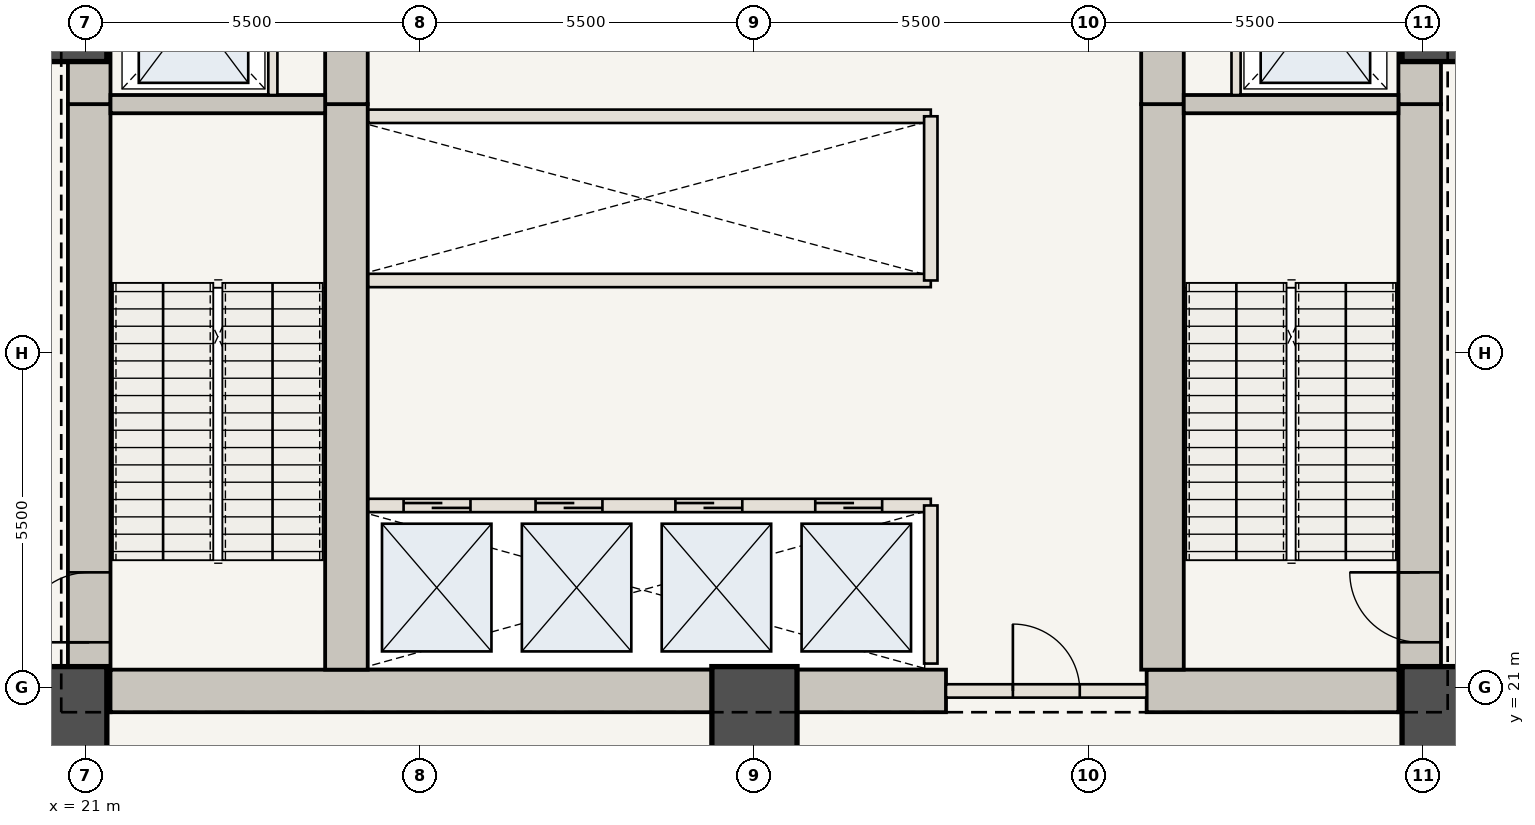
"""IFC4 building model, lengths in metres.
Left out: names, types, materials, properties, quantities, classifications, styles, units other than length and angle.
Written with IfcOpenShell. Run it as: python <this file> out.ifc"""

import sys

from ifc_helpers import new_model, si_unit, direction, frame, frame_2d, origin, origin_2d, place, context, subcontext, project, spatial, rectangle, extrude, element, fill, save


model = new_model("IFC4")
c1 = context("Model", 3, precision=1e-05, world=origin(), true_north=direction((0.0, 1.0)))
c2 = subcontext(c1, "Body", "Model", "MODEL_VIEW")
j1 = project(units=[si_unit("LENGTHUNIT", "METRE"), si_unit("PLANEANGLEUNIT", "RADIAN")], contexts=[c1])
p1 = place(None, origin())
s1 = spatial("IfcSite", under=j1, at=p1, CompositionType="ELEMENT")
p2 = place(p1, origin())
s2 = spatial("IfcBuilding", under=s1, at=p2, CompositionType="ELEMENT")
p3 = place(p2, frame((0.0, 0.0, 17.85)))
s3 = spatial("IfcBuildingStorey", under=s2, at=p3, CompositionType="ELEMENT", Elevation=17.85)
p4 = place(p3, frame((21.06, 20.6, 0.0), z_axis=(0.0, 0.0, 1.0), x_axis=(0.0, 1.0, 0.0)))
e1 = element("IfcWall", 1, at=p4, inside=s3, PredefinedType="SHEAR", context=c2, shape_type="SweptSolid", body=[
    extrude(rectangle(XDim=10.0, YDim=0.7, at=frame_2d((5.0, 0.0))), origin(), (0.0, 0.0, 1.0), 5.95),
])
p5 = place(p4, frame((1.15, 0.0, 0.0)))
e2 = element("IfcOpeningElement", 2, at=p5, cuts=e1, PredefinedType="OPENING", context=c2, shape_type="SweptSolid", body=[
    extrude(rectangle(XDim=1.15, YDim=2.15, at=frame_2d((0.575, 1.075))), frame((0.0, 0.36, 0.0), z_axis=(0.0, -1.0, 0.0), x_axis=(1.0, 0.0, 0.0)), (0.0, 0.0, 1.0), 0.72),
])
p6 = place(p3, frame((21.06, 30.6, 0.0), z_axis=(0.0, 0.0, 1.0), x_axis=(0.0, 1.0, 0.0)))
e3 = element("IfcWall", 3, at=p6, inside=s3, PredefinedType="SHEAR", context=c2, shape_type="SweptSolid", body=[
    extrude(rectangle(XDim=12.75, YDim=0.7, at=frame_2d((6.375, 0.0))), origin(), (0.0, 0.0, 1.0), 5.95),
])
p7 = place(p6, frame((4.2, 0.0, 0.0)))
e4 = element("IfcOpeningElement", 4, at=p7, cuts=e3, PredefinedType="OPENING", context=c2, shape_type="SweptSolid", body=[
    extrude(rectangle(XDim=1.1, YDim=2.15, at=frame_2d((0.55, 1.075))), frame((0.0, 0.36, 0.0), z_axis=(0.0, -1.0, 0.0), x_axis=(1.0, 0.0, 0.0)), (0.0, 0.0, 1.0), 0.72),
])
p8 = place(p6, frame((8.05, 0.0, 0.0)))
e5 = element("IfcOpeningElement", 5, at=p8, cuts=e3, PredefinedType="OPENING", context=c2, shape_type="SweptSolid", body=[
    extrude(rectangle(XDim=0.92, YDim=2.1, at=frame_2d((0.46, 1.05))), frame((0.0, 0.36, 0.0), z_axis=(0.0, -1.0, 0.0), x_axis=(1.0, 0.0, 0.0)), (0.0, 0.0, 1.0), 0.72),
])
p9 = place(p6, frame((9.45, 0.0, 0.0)))
e6 = element("IfcOpeningElement", 6, at=p9, cuts=e3, PredefinedType="OPENING", context=c2, shape_type="SweptSolid", body=[
    extrude(rectangle(XDim=0.88, YDim=2.1, at=frame_2d((0.44, 1.05))), frame((0.0, 0.36, 0.0), z_axis=(0.0, -1.0, 0.0), x_axis=(1.0, 0.0, 0.0)), (0.0, 0.0, 1.0), 0.72),
])
p10 = place(p6, frame((10.85, 0.0, 0.0)))
e7 = element("IfcOpeningElement", 7, at=p10, cuts=e3, PredefinedType="OPENING", context=c2, shape_type="SweptSolid", body=[
    extrude(rectangle(XDim=0.88, YDim=2.1, at=frame_2d((0.44, 1.05))), frame((0.0, 0.36, 0.0), z_axis=(0.0, -1.0, 0.0), x_axis=(1.0, 0.0, 0.0)), (0.0, 0.0, 1.0), 0.72),
])
p11 = place(p3, frame((42.94, 20.6, 0.0), z_axis=(0.0, 0.0, 1.0), x_axis=(0.0, 1.0, 0.0)))
e8 = element("IfcWall", 8, at=p11, inside=s3, PredefinedType="SHEAR", context=c2, shape_type="SweptSolid", body=[
    extrude(rectangle(XDim=10.0, YDim=0.7, at=frame_2d((5.0, 0.0))), origin(), (0.0, 0.0, 1.0), 5.95),
])
p12 = place(p11, frame((1.15, 0.0, 0.0)))
e9 = element("IfcOpeningElement", 9, at=p12, cuts=e8, PredefinedType="OPENING", context=c2, shape_type="SweptSolid", body=[
    extrude(rectangle(XDim=1.15, YDim=2.15, at=frame_2d((0.575, 1.075))), frame((0.0, 0.36, 0.0), z_axis=(0.0, -1.0, 0.0), x_axis=(1.0, 0.0, 0.0)), (0.0, 0.0, 1.0), 0.72),
])
p13 = place(p3, frame((42.94, 30.6, 0.0), z_axis=(0.0, 0.0, 1.0), x_axis=(0.0, 1.0, 0.0)))
e10 = element("IfcWall", 10, at=p13, inside=s3, PredefinedType="SHEAR", context=c2, shape_type="SweptSolid", body=[
    extrude(rectangle(XDim=12.75, YDim=0.7, at=frame_2d((6.375, 0.0))), origin(), (0.0, 0.0, 1.0), 5.95),
])
p14 = place(p13, frame((4.2, 0.0, 0.0)))
e11 = element("IfcOpeningElement", 11, at=p14, cuts=e10, PredefinedType="OPENING", context=c2, shape_type="SweptSolid", body=[
    extrude(rectangle(XDim=1.1, YDim=2.15, at=frame_2d((0.55, 1.075))), frame((0.0, 0.36, 0.0), z_axis=(0.0, -1.0, 0.0), x_axis=(1.0, 0.0, 0.0)), (0.0, 0.0, 1.0), 0.72),
])
p15 = place(p13, frame((9.2, 0.0, 0.0)))
e12 = element("IfcOpeningElement", 12, at=p15, cuts=e10, PredefinedType="OPENING", context=c2, shape_type="SweptSolid", body=[
    extrude(rectangle(XDim=0.92, YDim=2.1, at=frame_2d((0.46, 1.05))), frame((0.0, 0.36, 0.0), z_axis=(0.0, -1.0, 0.0), x_axis=(1.0, 0.0, 0.0)), (0.0, 0.0, 1.0), 0.72),
])
p16 = place(p3, frame((21.41, 20.95, 0.0), z_axis=(0.0, 0.0, 1.0), x_axis=(1.0, 0.0, 0.0)))
e13 = element("IfcWall", 13, at=p16, inside=s3, PredefinedType="SHEAR", context=c2, shape_type="SweptSolid", body=[
    extrude(rectangle(XDim=13.74, YDim=0.7, at=frame_2d((6.87, 0.0))), origin(), (0.0, 0.0, 1.0), 5.95),
])
p17 = place(p3, frame((38.45, 20.95, 0.0), z_axis=(0.0, 0.0, 1.0), x_axis=(1.0, 0.0, 0.0)))
e14 = element("IfcWall", 14, at=p17, inside=s3, PredefinedType="SHEAR", context=c2, shape_type="SweptSolid", body=[
    extrude(rectangle(XDim=4.14, YDim=0.7, at=frame_2d((2.07, 0.0))), origin(), (0.0, 0.0, 1.0), 5.95),
])
p18 = place(p3, frame((25.29, 21.3, 0.0), z_axis=(0.0, 0.0, 1.0), x_axis=(0.0, 1.0, 0.0)))
e15 = element("IfcWall", 15, at=p18, inside=s3, PredefinedType="SHEAR", context=c2, shape_type="SweptSolid", body=[
    extrude(rectangle(XDim=9.3, YDim=0.7, at=frame_2d((4.65, 0.0))), origin(), (0.0, 0.0, 1.0), 5.95),
])
p19 = place(p3, frame((25.29, 30.6, 0.0), z_axis=(0.0, 0.0, 1.0), x_axis=(0.0, 1.0, 0.0)))
e16 = element("IfcWall", 16, at=p19, inside=s3, PredefinedType="SHEAR", context=c2, shape_type="SweptSolid", body=[
    extrude(rectangle(XDim=12.05, YDim=0.7, at=frame_2d((6.025, 0.0))), origin(), (0.0, 0.0, 1.0), 5.95),
])
p20 = place(p19, frame((6.25, 0.0, 0.0)))
e17 = element("IfcOpeningElement", 17, at=p20, cuts=e16, PredefinedType="OPENING", context=c2, shape_type="SweptSolid", body=[
    extrude(rectangle(XDim=1.1, YDim=2.15, at=frame_2d((0.55, 1.075))), frame((0.0, 0.36, 0.0), z_axis=(0.0, -1.0, 0.0), x_axis=(1.0, 0.0, 0.0)), (0.0, 0.0, 1.0), 0.72),
])
p21 = place(p3, frame((38.71, 21.3, 0.0), z_axis=(0.0, 0.0, 1.0), x_axis=(0.0, 1.0, 0.0)))
e18 = element("IfcWall", 18, at=p21, inside=s3, PredefinedType="SHEAR", context=c2, shape_type="SweptSolid", body=[
    extrude(rectangle(XDim=9.3, YDim=0.7, at=frame_2d((4.65, 0.0))), origin(), (0.0, 0.0, 1.0), 5.95),
])
p22 = place(p3, frame((38.71, 30.6, 0.0), z_axis=(0.0, 0.0, 1.0), x_axis=(0.0, 1.0, 0.0)))
e19 = element("IfcWall", 19, at=p22, inside=s3, PredefinedType="SHEAR", context=c2, shape_type="SweptSolid", body=[
    extrude(rectangle(XDim=12.05, YDim=0.7, at=frame_2d((6.025, 0.0))), origin(), (0.0, 0.0, 1.0), 5.95),
])
for number, where, z_axis, x_axis in (
    (20, (20.65, 20.65, 0.0), (0.0, 0.0, 1.0), (1.0, 0.0, 0.0)),
    (21, (32.0, 20.65, 0.0), (0.0, 0.0, 1.0), (1.0, 0.0, 0.0)),
    (22, (43.35, 20.65, 0.0), (0.0, 0.0, 1.0), (1.0, 0.0, 0.0)),
    (23, (43.35, 32.0, 0.0), (0.0, 0.0, 1.0), (1.0, 0.0, 0.0)),
    (24, (20.65, 32.0, 0.0), (0.0, 0.0, 1.0), (1.0, 0.0, 0.0)),
):
    element("IfcColumn", number, at=place(p3, frame(where, z_axis=z_axis, x_axis=x_axis)), inside=s3, PredefinedType="COLUMN", context=c2, shape_type="SweptSolid", body=[
        extrude(rectangle(XDim=1.4, YDim=1.4, at=origin_2d()), origin(), (0.0, 0.0, 1.0), 5.95),
    ])
for number, where, z_axis, x_axis in (
    (25, (21.41, 30.6, 0.0), (0.0, 0.0, 1.0), (1.0, 0.0, 0.0)),
    (26, (39.06, 30.6, 0.0), (0.0, 0.0, 1.0), (1.0, 0.0, 0.0)),
):
    element("IfcWall", number, at=place(p3, frame(where, z_axis=z_axis, x_axis=x_axis)), inside=s3, PredefinedType="SHEAR", context=c2, shape_type="SweptSolid", body=[
        extrude(rectangle(XDim=3.53, YDim=0.3, at=frame_2d((1.765, 0.0))), origin(), (0.0, 0.0, 1.0), 5.71),
    ])
for number, where, z_axis, x_axis in (
    (27, (24.08, 30.75, 0.0), (0.0, 0.0, 1.0), (0.0, 1.0, 0.0)),
    (28, (39.92, 30.75, 0.0), (0.0, 0.0, 1.0), (0.0, 1.0, 0.0)),
):
    element("IfcWall", number, at=place(p3, frame(where, z_axis=z_axis, x_axis=x_axis)), inside=s3, PredefinedType="STANDARD", context=c2, shape_type="SweptSolid", body=[
        extrude(rectangle(XDim=2.65, YDim=0.15, at=frame_2d((1.325, 0.0))), origin(), (0.0, 0.0, 1.0), 5.71),
    ])
p23 = place(p3, frame((35.15, 20.95, 0.0), z_axis=(0.0, 0.0, 1.0), x_axis=(1.0, 0.0, 0.0)))
e29 = element("IfcWall", 29, at=p23, inside=s3, PredefinedType="STANDARD", context=c2, shape_type="SweptSolid", body=[
    extrude(rectangle(XDim=3.3, YDim=0.22, at=frame_2d((1.65, 0.0))), origin(), (0.0, 0.0, 1.0), 5.71),
])
p24 = place(p23, frame((1.1, 0.0, 0.0)))
e30 = element("IfcOpeningElement", 30, at=p24, cuts=e29, PredefinedType="OPENING", context=c2, shape_type="SweptSolid", body=[
    extrude(rectangle(XDim=1.1, YDim=2.15, at=frame_2d((0.55, 1.075))), frame((0.0, 0.12, 0.0), z_axis=(0.0, -1.0, 0.0), x_axis=(1.0, 0.0, 0.0)), (0.0, 0.0, 1.0), 0.24),
])
p25 = place(p3, frame((25.65, 24.0, 0.0), z_axis=(0.0, 0.0, 1.0), x_axis=(1.0, 0.0, 0.0)))
e31 = element("IfcWall", 31, at=p25, inside=s3, PredefinedType="STANDARD", context=c2, shape_type="SweptSolid", body=[
    extrude(rectangle(XDim=9.25, YDim=0.22, at=frame_2d((4.625, 0.0))), origin(), (0.0, 0.0, 1.0), 5.71),
])
p26 = place(p25, frame((0.58, 0.0, 0.0)))
e32 = element("IfcOpeningElement", 32, at=p26, cuts=e31, PredefinedType="OPENING", context=c2, shape_type="SweptSolid", body=[
    extrude(rectangle(XDim=1.1, YDim=2.15, at=frame_2d((0.55, 1.075))), frame((0.0, 0.12, 0.0), z_axis=(0.0, -1.0, 0.0), x_axis=(1.0, 0.0, 0.0)), (0.0, 0.0, 1.0), 0.24),
])
p27 = place(p25, frame((2.75, 0.0, 0.0)))
e33 = element("IfcOpeningElement", 33, at=p27, cuts=e31, PredefinedType="OPENING", context=c2, shape_type="SweptSolid", body=[
    extrude(rectangle(XDim=1.1, YDim=2.15, at=frame_2d((0.55, 1.075))), frame((0.0, 0.12, 0.0), z_axis=(0.0, -1.0, 0.0), x_axis=(1.0, 0.0, 0.0)), (0.0, 0.0, 1.0), 0.24),
])
p28 = place(p25, frame((5.05, 0.0, 0.0)))
e34 = element("IfcOpeningElement", 34, at=p28, cuts=e31, PredefinedType="OPENING", context=c2, shape_type="SweptSolid", body=[
    extrude(rectangle(XDim=1.1, YDim=2.15, at=frame_2d((0.55, 1.075))), frame((0.0, 0.12, 0.0), z_axis=(0.0, -1.0, 0.0), x_axis=(1.0, 0.0, 0.0)), (0.0, 0.0, 1.0), 0.24),
])
p29 = place(p25, frame((7.35, 0.0, 0.0)))
e35 = element("IfcOpeningElement", 35, at=p29, cuts=e31, PredefinedType="OPENING", context=c2, shape_type="SweptSolid", body=[
    extrude(rectangle(XDim=1.1, YDim=2.15, at=frame_2d((0.55, 1.075))), frame((0.0, 0.12, 0.0), z_axis=(0.0, -1.0, 0.0), x_axis=(1.0, 0.0, 0.0)), (0.0, 0.0, 1.0), 0.24),
])
p30 = place(p3, frame((34.9, 21.4, 0.0), z_axis=(0.0, 0.0, 1.0), x_axis=(0.0, 1.0, 0.0)))
e36 = element("IfcWall", 36, at=p30, inside=s3, PredefinedType="STANDARD", context=c2, shape_type="SweptSolid", body=[
    extrude(rectangle(XDim=2.6, YDim=0.22, at=frame_2d((1.3, 0.0))), origin(), (0.0, 0.0, 1.0), 5.71),
])
for number, where, z_axis, x_axis in (
    (37, (25.65, 27.7, 0.0), (0.0, 0.0, 1.0), (1.0, 0.0, 0.0)),
    (38, (25.65, 30.4, 0.0), (0.0, 0.0, 1.0), (1.0, 0.0, 0.0)),
):
    element("IfcWall", number, at=place(p3, frame(where, z_axis=z_axis, x_axis=x_axis)), inside=s3, PredefinedType="STANDARD", context=c2, shape_type="SweptSolid", body=[
        extrude(rectangle(XDim=9.25, YDim=0.22, at=frame_2d((4.625, 0.0))), origin(), (0.0, 0.0, 1.0), 5.71),
    ])
p31 = place(p3, frame((34.9, 27.7, 0.0), z_axis=(0.0, 0.0, 1.0), x_axis=(0.0, 1.0, 0.0)))
e39 = element("IfcWall", 39, at=p31, inside=s3, PredefinedType="STANDARD", context=c2, shape_type="SweptSolid", body=[
    extrude(rectangle(XDim=2.7, YDim=0.22, at=frame_2d((1.35, 0.0))), origin(), (0.0, 0.0, 1.0), 5.71),
])
p32 = place(p5, origin())
e40 = element("IfcDoor", 40, at=p32, inside=s3, OperationType="SINGLE_SWING_LEFT", PredefinedType="DOOR", context=c2, shape_type="SweptSolid", body=[
    extrude(rectangle(XDim=1.15, YDim=2.15, at=frame_2d((0.575, 1.075))), frame((0.0, 0.025, 0.0), z_axis=(0.0, -1.0, 0.0), x_axis=(1.0, 0.0, 0.0)), (0.0, 0.0, 1.0), 0.05),
])
fill(e2, e40)
p33 = place(p12, origin())
e41 = element("IfcDoor", 41, at=p33, inside=s3, OperationType="SINGLE_SWING_RIGHT", PredefinedType="DOOR", context=c2, shape_type="SweptSolid", body=[
    extrude(rectangle(XDim=1.15, YDim=2.15, at=frame_2d((0.575, 1.075))), frame((0.0, 0.025, 0.0), z_axis=(0.0, -1.0, 0.0), x_axis=(1.0, 0.0, 0.0)), (0.0, 0.0, 1.0), 0.05),
])
fill(e9, e41)
p34 = place(p24, origin())
e42 = element("IfcDoor", 42, at=p34, inside=s3, OperationType="SINGLE_SWING_LEFT", PredefinedType="DOOR", context=c2, shape_type="SweptSolid", body=[
    extrude(rectangle(XDim=1.1, YDim=2.15, at=frame_2d((0.55, 1.075))), frame((0.0, 0.025, 0.0), z_axis=(0.0, -1.0, 0.0), x_axis=(1.0, 0.0, 0.0)), (0.0, 0.0, 1.0), 0.05),
])
fill(e30, e42)
p35 = place(p26, origin())
e43 = element("IfcDoor", 43, at=p35, inside=s3, OperationType="DOUBLE_DOOR_SLIDING", PredefinedType="DOOR", context=c2, shape_type="SweptSolid", body=[
    extrude(rectangle(XDim=1.1, YDim=2.15, at=frame_2d((0.55, 1.075))), frame((0.0, 0.025, 0.0), z_axis=(0.0, -1.0, 0.0), x_axis=(1.0, 0.0, 0.0)), (0.0, 0.0, 1.0), 0.05),
])
fill(e32, e43)
p36 = place(p27, origin())
e44 = element("IfcDoor", 44, at=p36, inside=s3, OperationType="DOUBLE_DOOR_SLIDING", PredefinedType="DOOR", context=c2, shape_type="SweptSolid", body=[
    extrude(rectangle(XDim=1.1, YDim=2.15, at=frame_2d((0.55, 1.075))), frame((0.0, 0.025, 0.0), z_axis=(0.0, -1.0, 0.0), x_axis=(1.0, 0.0, 0.0)), (0.0, 0.0, 1.0), 0.05),
])
fill(e33, e44)
p37 = place(p28, origin())
e45 = element("IfcDoor", 45, at=p37, inside=s3, OperationType="DOUBLE_DOOR_SLIDING", PredefinedType="DOOR", context=c2, shape_type="SweptSolid", body=[
    extrude(rectangle(XDim=1.1, YDim=2.15, at=frame_2d((0.55, 1.075))), frame((0.0, 0.025, 0.0), z_axis=(0.0, -1.0, 0.0), x_axis=(1.0, 0.0, 0.0)), (0.0, 0.0, 1.0), 0.05),
])
fill(e34, e45)
p38 = place(p29, origin())
e46 = element("IfcDoor", 46, at=p38, inside=s3, OperationType="DOUBLE_DOOR_SLIDING", PredefinedType="DOOR", context=c2, shape_type="SweptSolid", body=[
    extrude(rectangle(XDim=1.1, YDim=2.15, at=frame_2d((0.55, 1.075))), frame((0.0, 0.025, 0.0), z_axis=(0.0, -1.0, 0.0), x_axis=(1.0, 0.0, 0.0)), (0.0, 0.0, 1.0), 0.05),
])
fill(e35, e46)
save(model, sys.argv[1])
